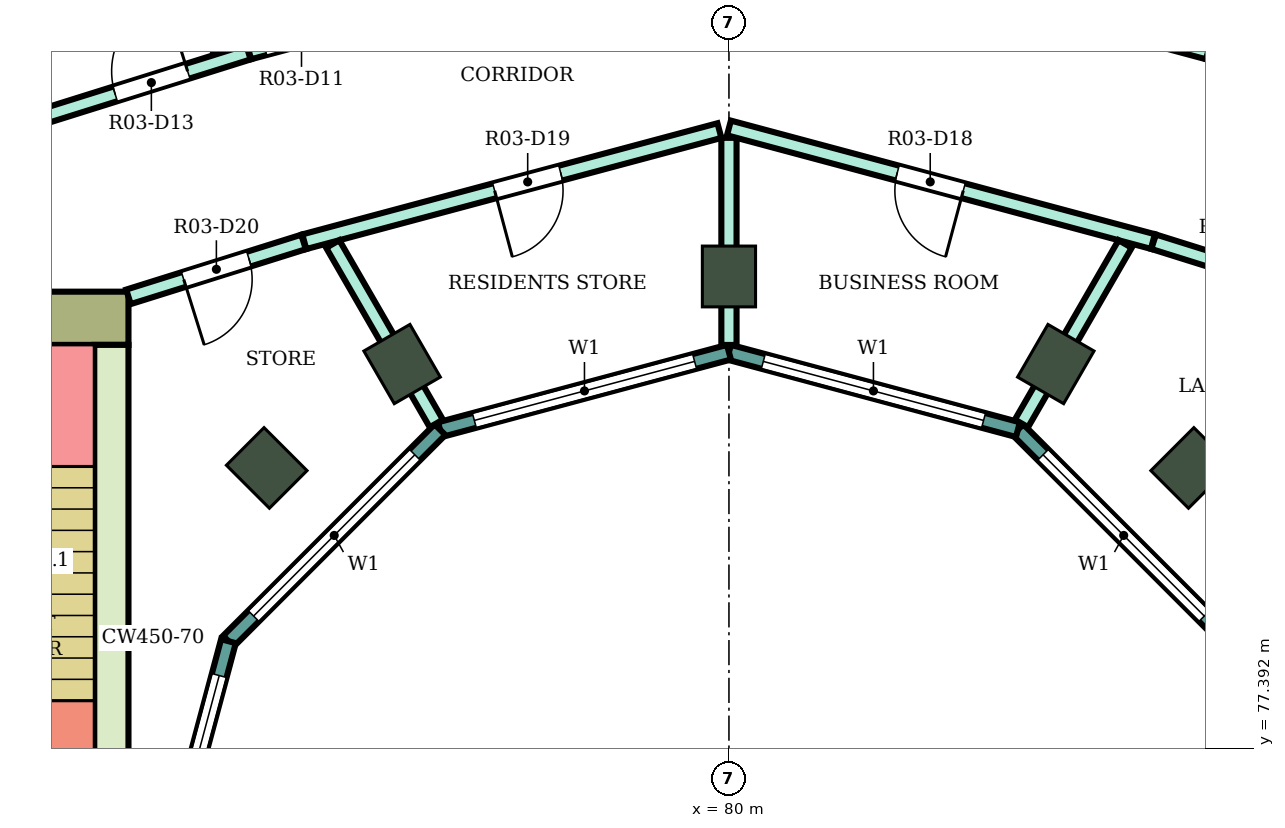
"""IFC4 building model, lengths in metres.
Left out: names, types, materials, properties, quantities, classifications, styles, units other than length and angle.
Written with IfcOpenShell. Run it as: python <this file> out.ifc"""

import sys

from ifc_helpers import new_model, si_unit, direction, frame, frame_2d, origin, origin_2d, place, context, subcontext, project, spatial, rectangle, extrude, element, fill, save


model = new_model("IFC4")
c1 = context("Model", 3, precision=1e-05, world=origin(), true_north=direction((0.0, 1.0)))
c2 = subcontext(c1, "Body", "Model", "MODEL_VIEW")
j1 = project(units=[si_unit("LENGTHUNIT", "METRE"), si_unit("PLANEANGLEUNIT", "RADIAN")], contexts=[c1])
p1 = place(None, origin())
s1 = spatial("IfcSite", under=j1, at=p1, CompositionType="ELEMENT")
p2 = place(p1, origin())
s2 = spatial("IfcBuilding", under=s1, at=p2, CompositionType="ELEMENT")
p3 = place(p2, frame((0.0, 0.0, 182.3)))
s3 = spatial("IfcBuildingStorey", under=s2, at=p3, CompositionType="ELEMENT", Elevation=182.3)
for number, where, z_axis, x_axis in (
    (1, (86.081, 81.081, 0.0), (0.0, 0.0, 1.0), (0.707, 0.707, 0.0)),
    (2, (84.3, 82.448, 0.0), (0.0, 0.0, 1.0), (0.5, 0.866, 0.0)),
    (3, (80.0, 83.6, 0.0), (0.0, 0.0, 1.0), (0.0, 1.0, 0.0)),
    (4, (75.7, 82.448, 0.0), (0.0, 0.0, 1.0), (-0.5, 0.866, 0.0)),
    (5, (73.919, 81.081, 0.0), (0.0, 0.0, 1.0), (-0.707, 0.707, 0.0)),
):
    element("IfcColumn", number, at=place(p3, frame(where, z_axis=z_axis, x_axis=x_axis)), inside=s3, PredefinedType="COLUMN", context=c2, shape_type="SweptSolid", body=[
        extrude(rectangle(XDim=0.8, YDim=0.7, at=origin_2d()), origin(), (0.0, 0.0, 1.0), 4.1),
    ])
p4 = place(p3, frame((72.1, 83.05, 0.0), z_axis=(0.0, 0.0, 1.0), x_axis=(-1.0, 0.0, 0.0)))
e6 = element("IfcWall", 6, at=p4, inside=s3, PredefinedType="SHEAR", context=c2, shape_type="SweptSolid", body=[
    extrude(rectangle(XDim=14.8, YDim=0.7, at=frame_2d((7.4, 0.0))), origin(), (0.0, 0.0, 1.0), 3.78),
])
p5 = place(p4, frame((4.2, 0.0, 0.0)))
e7 = element("IfcOpeningElement", 7, at=p5, cuts=e6, PredefinedType="OPENING", context=c2, shape_type="SweptSolid", body=[
    extrude(rectangle(XDim=2.4, YDim=2.4, at=frame_2d((1.2, 1.2))), frame((0.0, 0.36, 0.0), z_axis=(0.0, -1.0, 0.0), x_axis=(1.0, 0.0, 0.0)), (0.0, 0.0, 1.0), 0.72),
])
p6 = place(p3, frame((71.875, 82.7, 0.0), z_axis=(0.0, 0.0, 1.0), x_axis=(0.0, -1.0, 0.0)))
e8 = element("IfcWall", 8, at=p6, inside=s3, PredefinedType="SHEAR", context=c2, shape_type="SweptSolid", body=[
    extrude(rectangle(XDim=7.7, YDim=0.45, at=frame_2d((3.85, 0.0))), origin(), (0.0, 0.0, 1.0), 3.78),
])
p7 = place(p3, frame((86.585, 78.802, 0.0), z_axis=(0.0, 0.0, 1.0), x_axis=(-0.707106781187, 0.707106781187, 0.0)))
e9 = element("IfcWall", 9, at=p7, inside=s3, PredefinedType="NOTDEFINED", context=c2, shape_type="SweptSolid", body=[
    extrude(rectangle(XDim=3.936, YDim=0.2, at=frame_2d((1.968, 0.0))), origin(), (0.0, 0.0, 1.0), 4.1),
])
p8 = place(p7, frame((0.468, 0.0, 0.9)))
e10 = element("IfcOpeningElement", 10, at=p8, cuts=e9, PredefinedType="OPENING", context=c2, shape_type="SweptSolid", body=[
    extrude(rectangle(XDim=3.0, YDim=2.3, at=frame_2d((1.5, 1.15))), frame((0.0, 0.11, 0.0), z_axis=(0.0, -1.0, 0.0), x_axis=(1.0, 0.0, 0.0)), (0.0, 0.0, 1.0), 0.22),
])
p9 = place(p3, frame((83.802, 81.585, 0.0), z_axis=(0.0, 0.0, 1.0), x_axis=(-0.965933654434, 0.258789828301, 0.0)))
e11 = element("IfcWall", 11, at=p9, inside=s3, PredefinedType="NOTDEFINED", context=c2, shape_type="SweptSolid", body=[
    extrude(rectangle(XDim=3.936, YDim=0.2, at=frame_2d((1.968, 0.0))), origin(), (0.0, 0.0, 1.0), 4.1),
])
p10 = place(p9, frame((0.468, 0.0, 0.9)))
e12 = element("IfcOpeningElement", 12, at=p10, cuts=e11, PredefinedType="OPENING", context=c2, shape_type="SweptSolid", body=[
    extrude(rectangle(XDim=3.0, YDim=2.3, at=frame_2d((1.5, 1.15))), frame((0.0, 0.11, 0.0), z_axis=(0.0, -1.0, 0.0), x_axis=(1.0, 0.0, 0.0)), (0.0, 0.0, 1.0), 0.22),
])
p11 = place(p3, frame((80.0, 82.604, 0.0), z_axis=(0.0, 0.0, 1.0), x_axis=(-0.965933654434, -0.258789828301, 0.0)))
e13 = element("IfcWall", 13, at=p11, inside=s3, PredefinedType="NOTDEFINED", context=c2, shape_type="SweptSolid", body=[
    extrude(rectangle(XDim=3.936, YDim=0.2, at=frame_2d((1.968, 0.0))), origin(), (0.0, 0.0, 1.0), 4.1),
])
p12 = place(p11, frame((0.468, 0.0, 0.9)))
e14 = element("IfcOpeningElement", 14, at=p12, cuts=e13, PredefinedType="OPENING", context=c2, shape_type="SweptSolid", body=[
    extrude(rectangle(XDim=3.0, YDim=2.3, at=frame_2d((1.5, 1.15))), frame((0.0, 0.11, 0.0), z_axis=(0.0, -1.0, 0.0), x_axis=(1.0, 0.0, 0.0)), (0.0, 0.0, 1.0), 0.22),
])
p13 = place(p3, frame((76.198, 81.585, 0.0), z_axis=(0.0, 0.0, 1.0), x_axis=(-0.707106781187, -0.707106781187, 0.0)))
e15 = element("IfcWall", 15, at=p13, inside=s3, PredefinedType="NOTDEFINED", context=c2, shape_type="SweptSolid", body=[
    extrude(rectangle(XDim=3.936, YDim=0.2, at=frame_2d((1.968, 0.0))), origin(), (0.0, 0.0, 1.0), 4.1),
])
p14 = place(p13, frame((0.468, 0.0, 0.9)))
e16 = element("IfcOpeningElement", 16, at=p14, cuts=e15, PredefinedType="OPENING", context=c2, shape_type="SweptSolid", body=[
    extrude(rectangle(XDim=3.0, YDim=2.3, at=frame_2d((1.5, 1.15))), frame((0.0, 0.11, 0.0), z_axis=(0.0, -1.0, 0.0), x_axis=(1.0, 0.0, 0.0)), (0.0, 0.0, 1.0), 0.22),
])
p15 = place(p3, frame((73.415, 78.802, 0.0), z_axis=(0.0, 0.0, 1.0), x_axis=(-0.258789828301, -0.965933654434, 0.0)))
e17 = element("IfcWall", 17, at=p15, inside=s3, PredefinedType="NOTDEFINED", context=c2, shape_type="SweptSolid", body=[
    extrude(rectangle(XDim=3.936, YDim=0.2, at=frame_2d((1.968, 0.0))), origin(), (0.0, 0.0, 1.0), 4.1),
])
p16 = place(p15, frame((0.468, 0.0, 0.9)))
e18 = element("IfcOpeningElement", 18, at=p16, cuts=e17, PredefinedType="OPENING", context=c2, shape_type="SweptSolid", body=[
    extrude(rectangle(XDim=3.0, YDim=2.3, at=frame_2d((1.5, 1.15))), frame((0.0, 0.11, 0.0), z_axis=(0.0, -1.0, 0.0), x_axis=(1.0, 0.0, 0.0)), (0.0, 0.0, 1.0), 0.22),
])
p17 = place(p3, frame((67.102, 97.342, 0.0), z_axis=(0.0, 0.0, 1.0), x_axis=(0.499940938316, -0.866059500378, 0.0)))
e19 = element("IfcWall", 19, at=p17, inside=s3, PredefinedType="PARTITIONING", context=c2, shape_type="SweptSolid", body=[
    extrude(rectangle(XDim=12.446, YDim=0.2, at=frame_2d((6.223, 0.0))), origin(), (0.0, 0.0, 1.0), 3.65),
])
p18 = place(p3, frame((68.2, 84.833, 0.0), z_axis=(0.0, 0.0, 1.0), x_axis=(0.954204109499, 0.299156342762, 0.0)))
e20 = element("IfcWall", 20, at=p18, inside=s3, PredefinedType="PARTITIONING", context=c2, shape_type="SweptSolid", body=[
    extrude(rectangle(XDim=5.74, YDim=0.2, at=frame_2d((2.87, 0.0))), origin(), (0.0, 0.0, 1.0), 3.65),
])
p19 = place(p18, frame((3.903, 0.0, 0.0)))
e21 = element("IfcOpeningElement", 21, at=p19, cuts=e20, PredefinedType="OPENING", context=c2, shape_type="SweptSolid", body=[
    extrude(rectangle(XDim=1.0, YDim=2.1, at=frame_2d((0.5, 1.05))), frame((0.0, 0.11, 0.0), z_axis=(0.0, -1.0, 0.0), x_axis=(1.0, 0.0, 0.0)), (0.0, 0.0, 1.0), 0.22),
])
p20 = place(p3, frame((72.1, 83.332, 0.0), z_axis=(0.0, 0.0, 1.0), x_axis=(0.954233106619, 0.299063836383, 0.0)))
e22 = element("IfcWall", 22, at=p20, inside=s3, PredefinedType="PARTITIONING", context=c2, shape_type="SweptSolid", body=[
    extrude(rectangle(XDim=2.414, YDim=0.2, at=frame_2d((1.207, 0.0))), origin(), (0.0, 0.0, 1.0), 3.65),
])
p21 = place(p20, frame((0.762, 0.0, 0.0)))
e23 = element("IfcOpeningElement", 23, at=p21, cuts=e22, PredefinedType="OPENING", context=c2, shape_type="SweptSolid", body=[
    extrude(rectangle(XDim=0.9, YDim=2.1, at=frame_2d((0.45, 1.05))), frame((0.0, 0.11, 0.0), z_axis=(0.0, -1.0, 0.0), x_axis=(1.0, 0.0, 0.0)), (0.0, 0.0, 1.0), 0.22),
])
p22 = place(p3, frame((73.687, 86.554, 0.0), z_axis=(0.0, 0.0, 1.0), x_axis=(0.965992724769, 0.258569247387, 0.0)))
e24 = element("IfcWall", 24, at=p22, inside=s3, PredefinedType="PARTITIONING", context=c2, shape_type="SweptSolid", body=[
    extrude(rectangle(XDim=6.486, YDim=0.2, at=frame_2d((3.243, 0.0))), origin(), (0.0, 0.0, 1.0), 3.65),
])
p23 = place(p22, frame((0.214, 0.0, 0.0)))
e25 = element("IfcOpeningElement", 25, at=p23, cuts=e24, PredefinedType="OPENING", context=c2, shape_type="SweptSolid", body=[
    extrude(rectangle(XDim=1.0, YDim=2.1, at=frame_2d((0.5, 1.05))), frame((0.0, 0.11, 0.0), z_axis=(0.0, -1.0, 0.0), x_axis=(1.0, 0.0, 0.0)), (0.0, 0.0, 1.0), 0.22),
])
p24 = place(p3, frame((74.413, 84.057, 0.0), z_axis=(0.0, 0.0, 1.0), x_axis=(0.965972135939, 0.258646153246, 0.0)))
e26 = element("IfcWall", 26, at=p24, inside=s3, PredefinedType="PARTITIONING", context=c2, shape_type="SweptSolid", body=[
    extrude(rectangle(XDim=5.654, YDim=0.2, at=frame_2d((2.827, 0.0))), origin(), (0.0, 0.0, 1.0), 3.65),
])
p25 = place(p24, frame((2.593, 0.0, 0.0)))
e27 = element("IfcOpeningElement", 27, at=p25, cuts=e26, PredefinedType="OPENING", context=c2, shape_type="SweptSolid", body=[
    extrude(rectangle(XDim=0.9, YDim=2.1, at=frame_2d((0.45, 1.05))), frame((0.0, 0.11, 0.0), z_axis=(0.0, -1.0, 0.0), x_axis=(1.0, 0.0, 0.0)), (0.0, 0.0, 1.0), 0.22),
])
p26 = place(p3, frame((74.788, 84.027, 0.0), z_axis=(0.0, 0.0, 1.0), x_axis=(0.499905962189, -0.866079689733, 0.0)))
e28 = element("IfcWall", 28, at=p26, inside=s3, PredefinedType="PARTITIONING", context=c2, shape_type="SweptSolid", body=[
    extrude(rectangle(XDim=2.726, YDim=0.2, at=frame_2d((1.363, 0.0))), origin(), (0.0, 0.0, 1.0), 3.65),
])
p27 = place(p3, frame((80.0, 82.699, 0.0), z_axis=(0.0, 0.0, 1.0), x_axis=(0.0, 1.0, 0.0)))
e29 = element("IfcWall", 29, at=p27, inside=s3, PredefinedType="PARTITIONING", context=c2, shape_type="SweptSolid", body=[
    extrude(rectangle(XDim=2.725, YDim=0.2, at=frame_2d((1.363, 0.0))), origin(), (0.0, 0.0, 1.0), 3.65),
])
p28 = place(p3, frame((80.0, 85.554, 0.0), z_axis=(0.0, 0.0, 1.0), x_axis=(0.965928989968, -0.258807237802, 0.0)))
e30 = element("IfcWall", 30, at=p28, inside=s3, PredefinedType="PARTITIONING", context=c2, shape_type="SweptSolid", body=[
    extrude(rectangle(XDim=5.774, YDim=0.2, at=frame_2d((2.887, 0.0))), origin(), (0.0, 0.0, 1.0), 3.65),
])
p29 = place(p28, frame((2.292, 0.0, 0.0)))
e31 = element("IfcOpeningElement", 31, at=p29, cuts=e30, PredefinedType="OPENING", context=c2, shape_type="SweptSolid", body=[
    extrude(rectangle(XDim=0.9, YDim=2.1, at=frame_2d((0.45, 1.05))), frame((0.0, 0.11, 0.0), z_axis=(0.0, -1.0, 0.0), x_axis=(1.0, 0.0, 0.0)), (0.0, 0.0, 1.0), 0.22),
])
p30 = place(p3, frame((80.048, 88.233, 0.0), z_axis=(0.0, 0.0, 1.0), x_axis=(0.965787353661, -0.259335280109, 0.0)))
e32 = element("IfcWall", 32, at=p30, inside=s3, PredefinedType="PARTITIONING", context=c2, shape_type="SweptSolid", body=[
    extrude(rectangle(XDim=6.476, YDim=0.2, at=frame_2d((3.238, 0.0))), origin(), (0.0, 0.0, 1.0), 3.65),
])
p31 = place(p30, frame((4.936, 0.0, 0.0)))
e33 = element("IfcOpeningElement", 33, at=p31, cuts=e32, PredefinedType="OPENING", context=c2, shape_type="SweptSolid", body=[
    extrude(rectangle(XDim=1.0, YDim=2.1, at=frame_2d((0.5, 1.05))), frame((0.0, 0.11, 0.0), z_axis=(0.0, -1.0, 0.0), x_axis=(1.0, 0.0, 0.0)), (0.0, 0.0, 1.0), 0.22),
])
p32 = place(p3, frame((83.849, 81.667, 0.0), z_axis=(0.0, 0.0, 1.0), x_axis=(0.500117899823, 0.865957323588, 0.0)))
e34 = element("IfcWall", 34, at=p32, inside=s3, PredefinedType="PARTITIONING", context=c2, shape_type="SweptSolid", body=[
    extrude(rectangle(XDim=2.725, YDim=0.2, at=frame_2d((1.363, 0.0))), origin(), (0.0, 0.0, 1.0), 3.65),
])
p33 = place(p3, frame((85.587, 84.057, 0.0), z_axis=(0.0, 0.0, 1.0), x_axis=(0.954239513179, -0.299043393987, 0.0)))
e35 = element("IfcWall", 35, at=p33, inside=s3, PredefinedType="PARTITIONING", context=c2, shape_type="SweptSolid", body=[
    extrude(rectangle(XDim=2.424, YDim=0.2, at=frame_2d((1.212, 0.0))), origin(), (0.0, 0.0, 1.0), 3.65),
])
p34 = place(p33, frame((0.762, 0.0, 0.0)))
e36 = element("IfcOpeningElement", 36, at=p34, cuts=e35, PredefinedType="OPENING", context=c2, shape_type="SweptSolid", body=[
    extrude(rectangle(XDim=0.9, YDim=2.1, at=frame_2d((0.45, 1.05))), frame((0.0, 0.11, 0.0), z_axis=(0.0, -1.0, 0.0), x_axis=(1.0, 0.0, 0.0)), (0.0, 0.0, 1.0), 0.22),
])
p35 = place(p8, origin())
e37 = element("IfcWindow", 37, at=p35, inside=s3, PartitioningType="SINGLE_PANEL", PredefinedType="WINDOW", context=c2, shape_type="SweptSolid", body=[
    extrude(rectangle(XDim=3.0, YDim=2.3, at=frame_2d((1.5, 1.15))), frame((0.0, 0.03, 0.0), z_axis=(0.0, -1.0, 0.0), x_axis=(1.0, 0.0, 0.0)), (0.0, 0.0, 1.0), 0.06),
])
fill(e10, e37)
p36 = place(p10, origin())
e38 = element("IfcWindow", 38, at=p36, inside=s3, PartitioningType="SINGLE_PANEL", PredefinedType="WINDOW", context=c2, shape_type="SweptSolid", body=[
    extrude(rectangle(XDim=3.0, YDim=2.3, at=frame_2d((1.5, 1.15))), frame((0.0, 0.03, 0.0), z_axis=(0.0, -1.0, 0.0), x_axis=(1.0, 0.0, 0.0)), (0.0, 0.0, 1.0), 0.06),
])
fill(e12, e38)
p37 = place(p12, origin())
e39 = element("IfcWindow", 39, at=p37, inside=s3, PartitioningType="SINGLE_PANEL", PredefinedType="WINDOW", context=c2, shape_type="SweptSolid", body=[
    extrude(rectangle(XDim=3.0, YDim=2.3, at=frame_2d((1.5, 1.15))), frame((0.0, 0.03, 0.0), z_axis=(0.0, -1.0, 0.0), x_axis=(1.0, 0.0, 0.0)), (0.0, 0.0, 1.0), 0.06),
])
fill(e14, e39)
p38 = place(p14, origin())
e40 = element("IfcWindow", 40, at=p38, inside=s3, PartitioningType="SINGLE_PANEL", PredefinedType="WINDOW", context=c2, shape_type="SweptSolid", body=[
    extrude(rectangle(XDim=3.0, YDim=2.3, at=frame_2d((1.5, 1.15))), frame((0.0, 0.03, 0.0), z_axis=(0.0, -1.0, 0.0), x_axis=(1.0, 0.0, 0.0)), (0.0, 0.0, 1.0), 0.06),
])
fill(e16, e40)
p39 = place(p16, origin())
e41 = element("IfcWindow", 41, at=p39, inside=s3, PartitioningType="SINGLE_PANEL", PredefinedType="WINDOW", context=c2, shape_type="SweptSolid", body=[
    extrude(rectangle(XDim=3.0, YDim=2.3, at=frame_2d((1.5, 1.15))), frame((0.0, 0.03, 0.0), z_axis=(0.0, -1.0, 0.0), x_axis=(1.0, 0.0, 0.0)), (0.0, 0.0, 1.0), 0.06),
])
fill(e18, e41)
p40 = place(p19, origin())
e42 = element("IfcDoor", 42, at=p40, inside=s3, OperationType="SINGLE_SWING_RIGHT", PredefinedType="DOOR", context=c2, shape_type="SweptSolid", body=[
    extrude(rectangle(XDim=1.0, YDim=2.1, at=frame_2d((0.5, 1.05))), frame((0.0, 0.025, 0.0), z_axis=(0.0, -1.0, 0.0), x_axis=(1.0, 0.0, 0.0)), (0.0, 0.0, 1.0), 0.05),
])
fill(e21, e42)
p41 = place(p29, frame((0.9, 0.0, 0.0), z_axis=(0.0, 0.0, 1.0), x_axis=(-1.0, 0.0, 0.0)))
e43 = element("IfcDoor", 43, at=p41, inside=s3, OperationType="SINGLE_SWING_LEFT", PredefinedType="DOOR", context=c2, shape_type="SweptSolid", body=[
    extrude(rectangle(XDim=0.9, YDim=2.1, at=frame_2d((0.45, 1.05))), frame((0.0, 0.025, 0.0), z_axis=(0.0, -1.0, 0.0), x_axis=(1.0, 0.0, 0.0)), (0.0, 0.0, 1.0), 0.05),
])
fill(e31, e43)
p42 = place(p25, frame((0.9, 0.0, 0.0), z_axis=(0.0, 0.0, 1.0), x_axis=(-1.0, 0.0, 0.0)))
e44 = element("IfcDoor", 44, at=p42, inside=s3, OperationType="SINGLE_SWING_RIGHT", PredefinedType="DOOR", context=c2, shape_type="SweptSolid", body=[
    extrude(rectangle(XDim=0.9, YDim=2.1, at=frame_2d((0.45, 1.05))), frame((0.0, 0.025, 0.0), z_axis=(0.0, -1.0, 0.0), x_axis=(1.0, 0.0, 0.0)), (0.0, 0.0, 1.0), 0.05),
])
fill(e27, e44)
p43 = place(p21, frame((0.9, 0.0, 0.0), z_axis=(0.0, 0.0, 1.0), x_axis=(-1.0, 0.0, 0.0)))
e45 = element("IfcDoor", 45, at=p43, inside=s3, OperationType="SINGLE_SWING_RIGHT", PredefinedType="DOOR", context=c2, shape_type="SweptSolid", body=[
    extrude(rectangle(XDim=0.9, YDim=2.1, at=frame_2d((0.45, 1.05))), frame((0.0, 0.025, 0.0), z_axis=(0.0, -1.0, 0.0), x_axis=(1.0, 0.0, 0.0)), (0.0, 0.0, 1.0), 0.05),
])
fill(e23, e45)
save(model, sys.argv[1])
